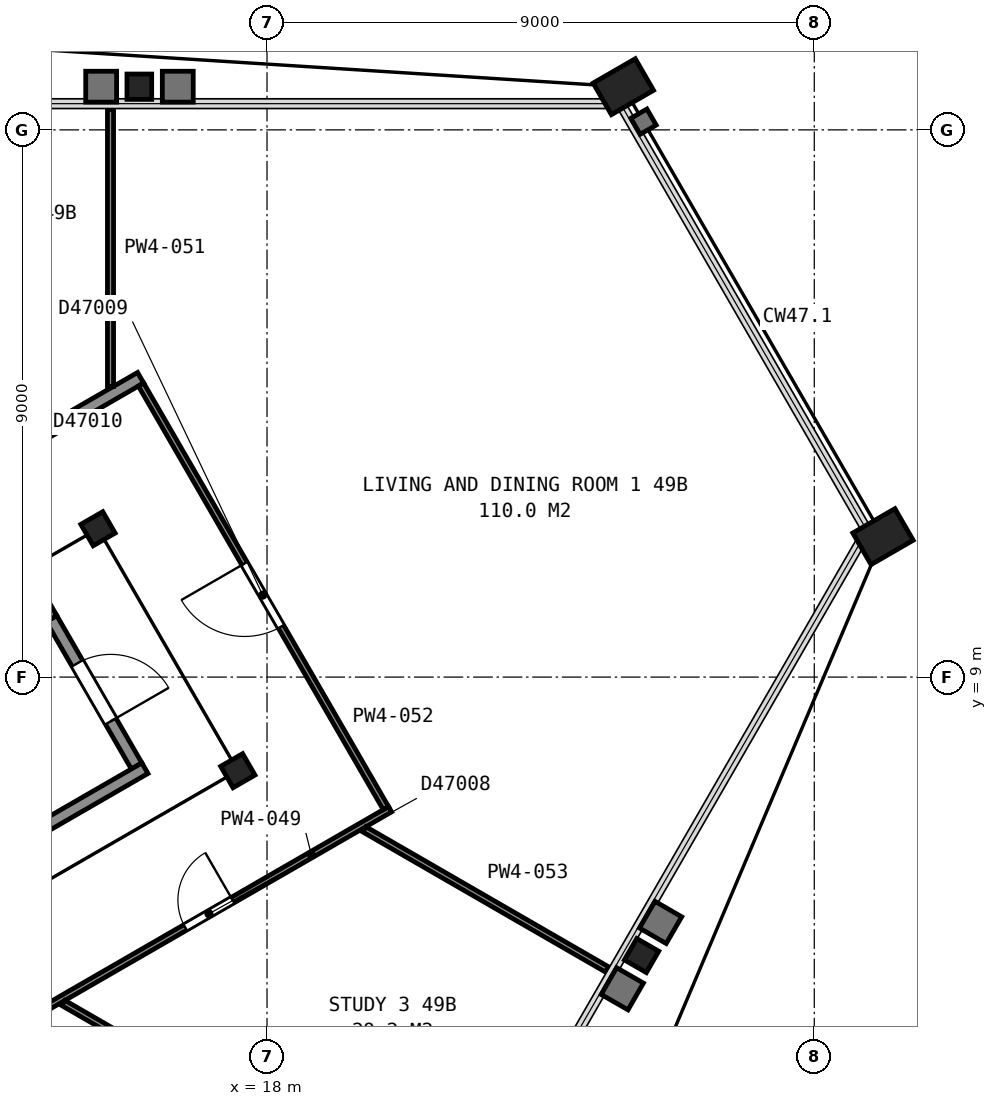
"""IFC4 building model, lengths in metres.
Left out: names, types, materials, properties, quantities, classifications, styles, units other than length and angle.
Written with IfcOpenShell. Run it as: python <this file> out.ifc"""

import sys

from ifc_helpers import new_model, si_unit, direction, frame, frame_2d, origin, origin_2d, place, context, subcontext, project, spatial, rectangle, hollow_rectangle, i_section, extrude, element, fill, save


model = new_model("IFC4")
c1 = context("Model", 3, precision=1e-05, world=origin(), true_north=direction((0.0, 1.0)))
c2 = subcontext(c1, "Body", "Model", "MODEL_VIEW")
j1 = project(units=[si_unit("LENGTHUNIT", "METRE"), si_unit("PLANEANGLEUNIT", "RADIAN")], contexts=[c1])
p1 = place(None, origin())
s1 = spatial("IfcSite", under=j1, at=p1, CompositionType="ELEMENT")
p2 = place(p1, origin())
s2 = spatial("IfcBuilding", under=s1, at=p2, CompositionType="ELEMENT")
p3 = place(p2, frame((0.0, 0.0, 196.9)))
s3 = spatial("IfcBuildingStorey", under=s2, at=p3, CompositionType="ELEMENT", Elevation=196.9)
p4 = place(p3, frame((23.86, 18.71, 0.0), z_axis=(0.0, 0.0, 1.0), x_axis=(0.5, -0.866025403784, 0.0)))
e1 = element("IfcColumn", 1, at=p4, inside=s3, PredefinedType="COLUMN", context=c2, shape_type="SweptSolid", body=[
    extrude(hollow_rectangle(XDim=0.6, YDim=0.8, WallThickness=0.05, at=origin_2d()), origin(), (0.0, 0.0, 1.0), 3.7),
])
for number, where, z_axis, x_axis in (
    (2, (15.9, 18.71, 0.0), (0.0, 0.0, 1.0), (1.0, 0.0, 0.0)),
    (3, (24.16, 4.42, 0.0), (0.0, 0.0, 1.0), (-0.5, -0.866, 0.0)),
):
    element("IfcColumn", number, at=place(p3, frame(where, z_axis=z_axis, x_axis=x_axis)), inside=s3, PredefinedType="COLUMN", context=c2, shape_type="SweptSolid", body=[
        extrude(i_section(OverallWidth=0.406, OverallDepth=0.417, WebThickness=0.03, FlangeThickness=0.048, FilletRadius=0.015, at=origin_2d()), origin(), (0.0, 0.0, 1.0), 3.01),
    ])
p5 = place(p3, frame((28.13, 11.31, 0.0), z_axis=(0.0, 0.0, 1.0), x_axis=(0.5, -0.866025403784, 0.0)))
e4 = element("IfcColumn", 4, at=p5, inside=s3, PredefinedType="COLUMN", context=c2, shape_type="SweptSolid", body=[
    extrude(hollow_rectangle(XDim=0.6, YDim=0.8, WallThickness=0.05, at=origin_2d()), origin(), (0.0, 0.0, 1.0), 3.7),
])
for number, where, z_axis, x_axis in (
    (5, (17.52, 7.46, 0.0), (0.0, 0.0, 1.0), (0.5, -0.866, 0.0)),
    (6, (15.22, 11.44, 0.0), (0.0, 0.0, 1.0), (0.5, -0.866, 0.0)),
):
    element("IfcColumn", number, at=place(p3, frame(where, z_axis=z_axis, x_axis=x_axis)), inside=s3, PredefinedType="COLUMN", context=c2, shape_type="SweptSolid", body=[
        extrude(i_section(OverallWidth=0.406, OverallDepth=0.417, WebThickness=0.03, FlangeThickness=0.048, FilletRadius=0.015, at=origin_2d()), origin(), (0.0, 0.0, 1.0), 3.7),
    ])
p6 = place(p3, frame((15.855, 7.538, 0.0), z_axis=(0.0, 0.0, 1.0), x_axis=(-0.500049511043, 0.865996816683, 0.0)))
e7 = element("IfcWall", 7, at=p6, inside=s3, PredefinedType="PARTITIONING", context=c2, shape_type="SweptSolid", body=[
    extrude(rectangle(XDim=2.8, YDim=0.2, at=frame_2d((1.4, 0.0))), origin(), (0.0, 0.0, 1.0), 3.45),
])
p7 = place(p6, frame((0.85, 0.0, 0.0)))
e8 = element("IfcOpeningElement", 8, at=p7, cuts=e7, PredefinedType="OPENING", context=c2, shape_type="SweptSolid", body=[
    extrude(rectangle(XDim=1.1, YDim=2.1, at=frame_2d((0.55, 1.05))), frame((0.0, 0.11, 0.0), z_axis=(0.0, -1.0, 0.0), x_axis=(1.0, 0.0, 0.0)), (0.0, 0.0, 1.0), 0.22),
])
for number, where, z_axis, x_axis in (
    (9, (6.178, 5.299, 0.0), (0.0, 0.0, 1.0), (0.866, 0.5, 0.0)),
    (10, (7.678, 2.701, 0.0), (0.0, 0.0, 1.0), (0.866, 0.5, 0.0)),
):
    element("IfcWall", number, at=place(p3, frame(where, z_axis=z_axis, x_axis=x_axis)), inside=s3, PredefinedType="PARTITIONING", context=c2, shape_type="SweptSolid", body=[
        extrude(rectangle(XDim=9.6, YDim=0.2, at=frame_2d((4.8, 0.0))), origin(), (0.0, 0.0, 1.0), 3.45),
    ])
p8 = place(p3, frame((8.895, 9.867, 0.0), z_axis=(0.0, 0.0, 1.0), x_axis=(0.866079355551, 0.499906541154, 0.0)))
e11 = element("IfcWall", 11, at=p8, inside=s3, PredefinedType="PARTITIONING", context=c2, shape_type="SweptSolid", body=[
    extrude(rectangle(XDim=8.113, YDim=0.2, at=frame_2d((4.056, 0.0))), origin(), (0.0, 0.0, 1.0), 2.362),
])
p9 = place(p8, frame((5.201, 0.0, 0.0)))
e12 = element("IfcOpeningElement", 12, at=p9, cuts=e11, PredefinedType="OPENING", context=c2, shape_type="SweptSolid", body=[
    extrude(rectangle(XDim=0.9, YDim=2.1, at=frame_2d((0.45, 1.05))), frame((0.0, 0.11, 0.0), z_axis=(0.0, -1.0, 0.0), x_axis=(1.0, 0.0, 0.0)), (0.0, 0.0, 1.0), 0.22),
])
p10 = place(p3, frame((20.023, 6.826, 0.0), z_axis=(0.0, 0.0, 1.0), x_axis=(-0.86608949446, -0.499888975259, 0.0)))
e13 = element("IfcWall", 13, at=p10, inside=s3, PredefinedType="PARTITIONING", context=c2, shape_type="SweptSolid", body=[
    extrude(rectangle(XDim=8.165, YDim=0.1, at=frame_2d((4.083, 0.0))), origin(), (0.0, 0.0, 1.0), 2.362),
])
p11 = place(p10, frame((6.8, 0.0, 0.0)))
e14 = element("IfcOpeningElement", 14, at=p11, cuts=e13, PredefinedType="OPENING", context=c2, shape_type="SweptSolid", body=[
    extrude(rectangle(XDim=0.9, YDim=2.1, at=frame_2d((0.45, 1.05))), frame((0.0, 0.06, 0.0), z_axis=(0.0, -1.0, 0.0), x_axis=(1.0, 0.0, 0.0)), (0.0, 0.0, 1.0), 0.12),
])
p12 = place(p10, frame((2.989, 0.0, 0.0)))
e15 = element("IfcOpeningElement", 15, at=p12, cuts=e13, PredefinedType="OPENING", context=c2, shape_type="SweptSolid", body=[
    extrude(rectangle(XDim=0.9, YDim=2.1, at=frame_2d((0.45, 1.05))), frame((0.0, 0.06, 0.0), z_axis=(0.0, -1.0, 0.0), x_axis=(1.0, 0.0, 0.0)), (0.0, 0.0, 1.0), 0.12),
])
p13 = place(p3, frame((14.651, 3.64, 0.0), z_axis=(0.0, 0.0, 1.0), x_axis=(0.866021145342, -0.500007375767, 0.0)))
e16 = element("IfcWall", 16, at=p13, inside=s3, PredefinedType="PARTITIONING", context=c2, shape_type="SweptSolid", body=[
    extrude(rectangle(XDim=7.467, YDim=0.1, at=frame_2d((3.733, 0.0))), origin(), (0.0, 0.0, 1.0), 2.362),
])
p14 = place(p3, frame((15.426, 13.781, 0.0), z_axis=(0.0, 0.0, 1.0), x_axis=(0.0, 1.0, 0.0)))
e17 = element("IfcWall", 17, at=p14, inside=s3, PredefinedType="PARTITIONING", context=c2, shape_type="SweptSolid", body=[
    extrude(rectangle(XDim=4.554, YDim=0.1, at=frame_2d((2.277, 0.0))), origin(), (0.0, 0.0, 1.0), 2.362),
])
p15 = place(p3, frame((15.928, 13.812, 0.0), z_axis=(0.0, 0.0, 1.0), x_axis=(0.500422653123, -0.865781247337, 0.0)))
e18 = element("IfcWall", 18, at=p15, inside=s3, PredefinedType="PARTITIONING", context=c2, shape_type="SweptSolid", body=[
    extrude(rectangle(XDim=8.047, YDim=0.1, at=frame_2d((4.024, 0.0))), origin(), (0.0, 0.0, 1.0), 2.362),
])
p16 = place(p15, frame((3.4, 0.0, 0.0)))
e19 = element("IfcOpeningElement", 19, at=p16, cuts=e18, PredefinedType="OPENING", context=c2, shape_type="SweptSolid", body=[
    extrude(rectangle(XDim=1.2, YDim=2.1, at=frame_2d((0.6, 1.05))), frame((0.0, 0.06, 0.0), z_axis=(0.0, -1.0, 0.0), x_axis=(1.0, 0.0, 0.0)), (0.0, 0.0, 1.0), 0.12),
])
p17 = place(p3, frame((19.601, 6.496, 0.0), z_axis=(0.0, 0.0, 1.0), x_axis=(0.866056775574, -0.499945658529, 0.0)))
e20 = element("IfcWall", 20, at=p17, inside=s3, PredefinedType="PARTITIONING", context=c2, shape_type="SweptSolid", body=[
    extrude(rectangle(XDim=4.608, YDim=0.1, at=frame_2d((2.304, 0.0))), origin(), (0.0, 0.0, 1.0), 2.362),
])
p18 = place(p7, origin())
e21 = element("IfcDoor", 21, at=p18, inside=s3, OperationType="SINGLE_SWING_LEFT", PredefinedType="DOOR", context=c2, shape_type="SweptSolid", body=[
    extrude(rectangle(XDim=1.1, YDim=2.1, at=frame_2d((0.55, 1.05))), frame((0.0, 0.025, 0.0), z_axis=(0.0, -1.0, 0.0), x_axis=(1.0, 0.0, 0.0)), (0.0, 0.0, 1.0), 0.05),
])
fill(e8, e21)
p19 = place(p12, origin())
e22 = element("IfcDoor", 22, at=p19, inside=s3, OperationType="SINGLE_SWING_LEFT", PredefinedType="DOOR", context=c2, shape_type="SweptSolid", body=[
    extrude(rectangle(XDim=0.9, YDim=2.1, at=frame_2d((0.45, 1.05))), frame((0.0, 0.025, 0.0), z_axis=(0.0, -1.0, 0.0), x_axis=(1.0, 0.0, 0.0)), (0.0, 0.0, 1.0), 0.05),
])
fill(e15, e22)
p20 = place(p16, origin())
e23 = element("IfcDoor", 23, at=p20, inside=s3, OperationType="SINGLE_SWING_LEFT", PredefinedType="DOOR", context=c2, shape_type="SweptSolid", body=[
    extrude(rectangle(XDim=1.2, YDim=2.1, at=frame_2d((0.6, 1.05))), frame((0.0, 0.025, 0.0), z_axis=(0.0, -1.0, 0.0), x_axis=(1.0, 0.0, 0.0)), (0.0, 0.0, 1.0), 0.05),
])
fill(e19, e23)
save(model, sys.argv[1])
